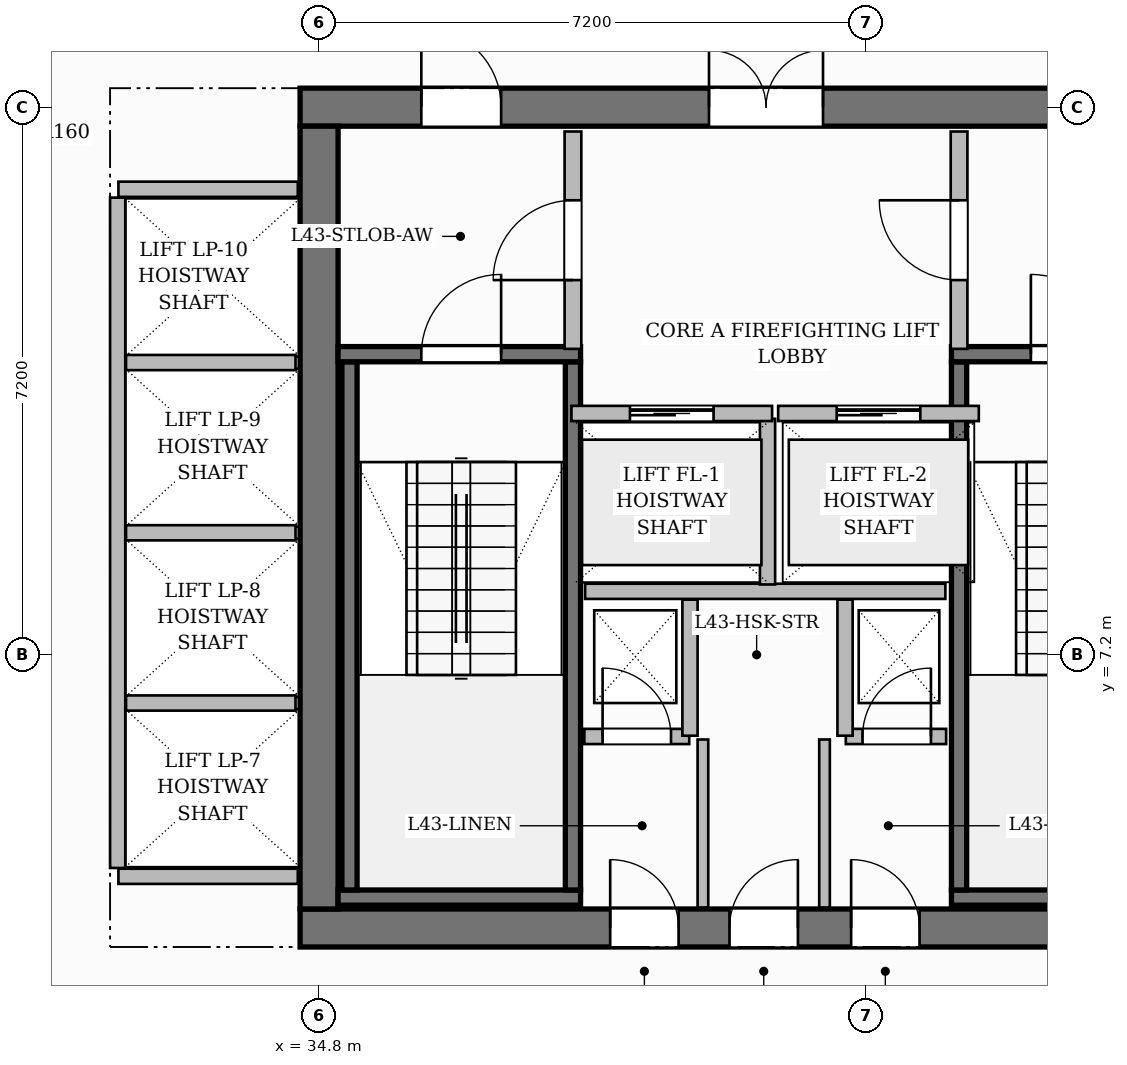
"""IFC4 building model, lengths in metres.
Left out: names, types, materials, properties, quantities, classifications, styles, units other than length and angle.
Written with IfcOpenShell. Run it as: python <this file> out.ifc"""

import sys

from ifc_helpers import new_model, si_unit, direction, frame, frame_2d, origin, place, context, subcontext, project, spatial, rectangle, extrude, source, transform, mapped, element, fill, save


model = new_model("IFC4")
c1 = context("Model", 3, precision=1e-05, world=origin(), true_north=direction((0.0, 1.0)))
c2 = subcontext(c1, "Body", "Model", "MODEL_VIEW")
j1 = project(units=[si_unit("LENGTHUNIT", "METRE"), si_unit("PLANEANGLEUNIT", "RADIAN")], contexts=[c1])
p1 = place(None, origin())
s1 = spatial("IfcSite", under=j1, at=p1, CompositionType="ELEMENT")
p2 = place(p1, origin())
s2 = spatial("IfcBuilding", under=s1, at=p2, CompositionType="ELEMENT")
p3 = place(p2, frame((0.0, 0.0, 173.4)))
s3 = spatial("IfcBuildingStorey", under=s2, at=p3, CompositionType="ELEMENT", Elevation=173.4)
p4 = place(p3, frame((34.55, 3.6, 0.0), z_axis=(0.0, 0.0, 1.0), x_axis=(1.0, 0.0, 0.0)))
e1 = element("IfcWall", 1, at=p4, inside=s3, PredefinedType="SHEAR", context=c2, shape_type="SweptSolid", body=[
    extrude(rectangle(XDim=15.5, YDim=0.5, at=frame_2d((7.75, 0.0))), origin(), (0.0, 0.0, 1.0), 3.85),
])
p5 = place(p4, frame((4.08, 0.0, 0.0)))
e2 = element("IfcOpeningElement", 2, at=p5, cuts=e1, PredefinedType="OPENING", context=c2, shape_type="SweptSolid", body=[
    extrude(rectangle(XDim=0.9, YDim=2.1, at=frame_2d((0.45, 1.05))), frame((0.0, 0.26, 0.0), z_axis=(0.0, -1.0, 0.0), x_axis=(1.0, 0.0, 0.0)), (0.0, 0.0, 1.0), 0.52),
])
p6 = place(p4, frame((5.65, 0.0, 0.0)))
e3 = element("IfcOpeningElement", 3, at=p6, cuts=e1, PredefinedType="OPENING", context=c2, shape_type="SweptSolid", body=[
    extrude(rectangle(XDim=0.9, YDim=2.1, at=frame_2d((0.45, 1.05))), frame((0.0, 0.26, 0.0), z_axis=(0.0, -1.0, 0.0), x_axis=(1.0, 0.0, 0.0)), (0.0, 0.0, 1.0), 0.52),
])
p7 = place(p4, frame((7.25, 0.0, 0.0)))
e4 = element("IfcOpeningElement", 4, at=p7, cuts=e1, PredefinedType="OPENING", context=c2, shape_type="SweptSolid", body=[
    extrude(rectangle(XDim=0.9, YDim=2.1, at=frame_2d((0.45, 1.05))), frame((0.0, 0.26, 0.0), z_axis=(0.0, -1.0, 0.0), x_axis=(1.0, 0.0, 0.0)), (0.0, 0.0, 1.0), 0.52),
])
p8 = place(p3, frame((34.55, 14.4, 0.0), z_axis=(0.0, 0.0, 1.0), x_axis=(1.0, 0.0, 0.0)))
e5 = element("IfcWall", 5, at=p8, inside=s3, PredefinedType="SHEAR", context=c2, shape_type="SweptSolid", body=[
    extrude(rectangle(XDim=15.5, YDim=0.5, at=frame_2d((7.75, 0.0))), origin(), (0.0, 0.0, 1.0), 3.85),
])
p9 = place(p8, frame((5.38, 0.0, 0.0)))
e6 = element("IfcOpeningElement", 6, at=p9, cuts=e5, PredefinedType="OPENING", context=c2, shape_type="SweptSolid", body=[
    extrude(rectangle(XDim=1.5, YDim=2.2, at=frame_2d((0.75, 1.1))), frame((0.0, 0.26, 0.0), z_axis=(0.0, -1.0, 0.0), x_axis=(1.0, 0.0, 0.0)), (0.0, 0.0, 1.0), 0.52),
])
p10 = place(p8, frame((1.595, 0.0, 0.0)))
e7 = element("IfcOpeningElement", 7, at=p10, cuts=e5, PredefinedType="OPENING", context=c2, shape_type="SweptSolid", body=[
    extrude(rectangle(XDim=1.05, YDim=2.15, at=frame_2d((0.525, 1.075))), frame((0.0, 0.26, 0.0), z_axis=(0.0, -1.0, 0.0), x_axis=(1.0, 0.0, 0.0)), (0.0, 0.0, 1.0), 0.52),
])
p11 = place(p8, frame((11.225, 0.0, 0.0)))
e8 = element("IfcOpeningElement", 8, at=p11, cuts=e5, PredefinedType="OPENING", context=c2, shape_type="SweptSolid", body=[
    extrude(rectangle(XDim=1.05, YDim=2.15, at=frame_2d((0.525, 1.075))), frame((0.0, 0.26, 0.0), z_axis=(0.0, -1.0, 0.0), x_axis=(1.0, 0.0, 0.0)), (0.0, 0.0, 1.0), 0.52),
])
p12 = place(p3, frame((34.8, 3.85, 0.0), z_axis=(0.0, 0.0, 1.0), x_axis=(0.0, 1.0, 0.0)))
e9 = element("IfcWall", 9, at=p12, inside=s3, PredefinedType="SHEAR", context=c2, shape_type="SweptSolid", body=[
    extrude(rectangle(XDim=10.3, YDim=0.5, at=frame_2d((5.15, 0.0))), origin(), (0.0, 0.0, 1.0), 3.85),
])
p13 = place(p3, frame((35.05, 4.0, 0.0), z_axis=(0.0, 0.0, 1.0), x_axis=(1.0, 0.0, 0.0)))
e10 = element("IfcWall", 10, at=p13, inside=s3, PredefinedType="SHEAR", context=c2, shape_type="SweptSolid", body=[
    extrude(rectangle(XDim=3.19, YDim=0.2, at=frame_2d((1.595, 0.0))), origin(), (0.0, 0.0, 1.0), 3.85),
])
for number, where, z_axis, x_axis in (
    (11, (35.2, 4.1, 0.0), (0.0, 0.0, 1.0), (0.0, 1.0, 0.0)),
    (12, (38.14, 4.1, 0.0), (0.0, 0.0, 1.0), (0.0, 1.0, 0.0)),
):
    element("IfcWall", number, at=place(p3, frame(where, z_axis=z_axis, x_axis=x_axis)), inside=s3, PredefinedType="SHEAR", context=c2, shape_type="SweptSolid", body=[
        extrude(rectangle(XDim=6.95, YDim=0.2, at=frame_2d((3.475, 0.0))), origin(), (0.0, 0.0, 1.0), 3.85),
    ])
p14 = place(p3, frame((35.05, 11.15, 0.0), z_axis=(0.0, 0.0, 1.0), x_axis=(1.0, 0.0, 0.0)))
e13 = element("IfcWall", 13, at=p14, inside=s3, PredefinedType="SHEAR", context=c2, shape_type="SweptSolid", body=[
    extrude(rectangle(XDim=3.19, YDim=0.2, at=frame_2d((1.595, 0.0))), origin(), (0.0, 0.0, 1.0), 3.85),
])
p15 = place(p14, frame((1.095, 0.0, 0.0)))
e14 = element("IfcOpeningElement", 14, at=p15, cuts=e13, PredefinedType="OPENING", context=c2, shape_type="SweptSolid", body=[
    extrude(rectangle(XDim=1.05, YDim=2.2, at=frame_2d((0.525, 1.1))), frame((0.0, 0.11, 0.0), z_axis=(0.0, -1.0, 0.0), x_axis=(1.0, 0.0, 0.0)), (0.0, 0.0, 1.0), 0.22),
])
p16 = place(p3, frame((43.12, 4.0, 0.0), z_axis=(0.0, 0.0, 1.0), x_axis=(1.0, 0.0, 0.0)))
e15 = element("IfcWall", 15, at=p16, inside=s3, PredefinedType="SHEAR", context=c2, shape_type="SweptSolid", body=[
    extrude(rectangle(XDim=6.43, YDim=0.2, at=frame_2d((3.215, 0.0))), origin(), (0.0, 0.0, 1.0), 3.85),
])
p17 = place(p3, frame((43.22, 4.1, 0.0), z_axis=(0.0, 0.0, 1.0), x_axis=(0.0, 1.0, 0.0)))
e16 = element("IfcWall", 16, at=p17, inside=s3, PredefinedType="SHEAR", context=c2, shape_type="SweptSolid", body=[
    extrude(rectangle(XDim=6.95, YDim=0.2, at=frame_2d((3.475, 0.0))), origin(), (0.0, 0.0, 1.0), 3.85),
])
p18 = place(p3, frame((43.12, 11.15, 0.0), z_axis=(0.0, 0.0, 1.0), x_axis=(1.0, 0.0, 0.0)))
e17 = element("IfcWall", 17, at=p18, inside=s3, PredefinedType="SHEAR", context=c2, shape_type="SweptSolid", body=[
    extrude(rectangle(XDim=6.43, YDim=0.2, at=frame_2d((3.215, 0.0))), origin(), (0.0, 0.0, 1.0), 3.85),
])
p19 = place(p18, frame((1.045, 0.0, 0.0)))
e18 = element("IfcOpeningElement", 18, at=p19, cuts=e17, PredefinedType="OPENING", context=c2, shape_type="SweptSolid", body=[
    extrude(rectangle(XDim=1.05, YDim=2.2, at=frame_2d((0.525, 1.1))), frame((0.0, 0.11, 0.0), z_axis=(0.0, -1.0, 0.0), x_axis=(1.0, 0.0, 0.0)), (0.0, 0.0, 1.0), 0.22),
])
p20 = place(p18, frame((4.125, 0.0, 0.0)))
e19 = element("IfcOpeningElement", 19, at=p20, cuts=e17, PredefinedType="OPENING", context=c2, shape_type="SweptSolid", body=[
    extrude(rectangle(XDim=1.05, YDim=2.2, at=frame_2d((0.525, 1.1))), frame((0.0, 0.11, 0.0), z_axis=(0.0, -1.0, 0.0), x_axis=(1.0, 0.0, 0.0)), (0.0, 0.0, 1.0), 0.22),
])
p21 = place(p3, frame((38.3, 8.03, 0.0), z_axis=(0.0, 0.0, 1.0), x_axis=(1.0, 0.0, 0.0)))
e20 = element("IfcWall", 20, at=p21, inside=s3, PredefinedType="PARTITIONING", context=c2, shape_type="SweptSolid", body=[
    extrude(rectangle(XDim=4.74, YDim=0.2, at=frame_2d((2.37, 0.0))), origin(), (0.0, 0.0, 1.0), 3.6),
])
p22 = place(p3, frame((40.7, 8.12, 0.0), z_axis=(0.0, 0.0, 1.0), x_axis=(0.0, 1.0, 0.0)))
e21 = element("IfcWall", 21, at=p22, inside=s3, PredefinedType="PARTITIONING", context=c2, shape_type="SweptSolid", body=[
    extrude(rectangle(XDim=2.18, YDim=0.2, at=frame_2d((1.09, 0.0))), origin(), (0.0, 0.0, 1.0), 3.6),
])
p23 = place(p3, frame((38.14, 11.22, 0.0), z_axis=(0.0, 0.0, 1.0), x_axis=(0.0, 1.0, 0.0)))
e22 = element("IfcWall", 22, at=p23, inside=s3, PredefinedType="PARTITIONING", context=c2, shape_type="SweptSolid", body=[
    extrude(rectangle(XDim=2.86, YDim=0.22, at=frame_2d((1.43, 0.0))), origin(), (0.0, 0.0, 1.0), 3.6),
])
p24 = place(p23, frame((0.905, 0.0, 0.0)))
e23 = element("IfcOpeningElement", 23, at=p24, cuts=e22, PredefinedType="OPENING", context=c2, shape_type="SweptSolid", body=[
    extrude(rectangle(XDim=1.05, YDim=2.15, at=frame_2d((0.525, 1.075))), frame((0.0, 0.12, 0.0), z_axis=(0.0, -1.0, 0.0), x_axis=(1.0, 0.0, 0.0)), (0.0, 0.0, 1.0), 0.24),
])
p25 = place(p3, frame((43.22, 11.22, 0.0), z_axis=(0.0, 0.0, 1.0), x_axis=(0.0, 1.0, 0.0)))
e24 = element("IfcWall", 24, at=p25, inside=s3, PredefinedType="PARTITIONING", context=c2, shape_type="SweptSolid", body=[
    extrude(rectangle(XDim=2.86, YDim=0.22, at=frame_2d((1.43, 0.0))), origin(), (0.0, 0.0, 1.0), 3.6),
])
p26 = place(p25, frame((0.905, 0.0, 0.0)))
e25 = element("IfcOpeningElement", 25, at=p26, cuts=e24, PredefinedType="OPENING", context=c2, shape_type="SweptSolid", body=[
    extrude(rectangle(XDim=1.05, YDim=2.15, at=frame_2d((0.525, 1.075))), frame((0.0, 0.12, 0.0), z_axis=(0.0, -1.0, 0.0), x_axis=(1.0, 0.0, 0.0)), (0.0, 0.0, 1.0), 0.24),
])
p27 = place(p3, frame((38.29, 6.12, 0.0), z_axis=(0.0, 0.0, 1.0), x_axis=(1.0, 0.0, 0.0)))
e26 = element("IfcWall", 26, at=p27, inside=s3, PredefinedType="PARTITIONING", context=c2, shape_type="SweptSolid", body=[
    extrude(rectangle(XDim=1.38, YDim=0.2, at=frame_2d((0.69, 0.0))), origin(), (0.0, 0.0, 1.0), 3.6),
])
p28 = place(p27, frame((0.24, 0.0, 0.0)))
e27 = element("IfcOpeningElement", 27, at=p28, cuts=e26, PredefinedType="OPENING", context=c2, shape_type="SweptSolid", body=[
    extrude(rectangle(XDim=0.9, YDim=2.1, at=frame_2d((0.45, 1.05))), frame((0.0, 0.11, 0.0), z_axis=(0.0, -1.0, 0.0), x_axis=(1.0, 0.0, 0.0)), (0.0, 0.0, 1.0), 0.22),
])
p29 = place(p3, frame((39.68, 6.13, 0.0), z_axis=(0.0, 0.0, 1.0), x_axis=(0.0, 1.0, 0.0)))
e28 = element("IfcWall", 28, at=p29, inside=s3, PredefinedType="PARTITIONING", context=c2, shape_type="SweptSolid", body=[
    extrude(rectangle(XDim=1.79, YDim=0.2, at=frame_2d((0.895, 0.0))), origin(), (0.0, 0.0, 1.0), 3.6),
])
p30 = place(p3, frame((41.73, 6.12, 0.0), z_axis=(0.0, 0.0, 1.0), x_axis=(1.0, 0.0, 0.0)))
e29 = element("IfcWall", 29, at=p30, inside=s3, PredefinedType="PARTITIONING", context=c2, shape_type="SweptSolid", body=[
    extrude(rectangle(XDim=1.32, YDim=0.2, at=frame_2d((0.66, 0.0))), origin(), (0.0, 0.0, 1.0), 3.6),
])
p31 = place(p30, frame((0.22, 0.0, 0.0)))
e30 = element("IfcOpeningElement", 30, at=p31, cuts=e29, PredefinedType="OPENING", context=c2, shape_type="SweptSolid", body=[
    extrude(rectangle(XDim=0.9, YDim=2.1, at=frame_2d((0.45, 1.05))), frame((0.0, 0.11, 0.0), z_axis=(0.0, -1.0, 0.0), x_axis=(1.0, 0.0, 0.0)), (0.0, 0.0, 1.0), 0.22),
])
p32 = place(p3, frame((41.72, 6.13, 0.0), z_axis=(0.0, 0.0, 1.0), x_axis=(0.0, 1.0, 0.0)))
e31 = element("IfcWall", 31, at=p32, inside=s3, PredefinedType="PARTITIONING", context=c2, shape_type="SweptSolid", body=[
    extrude(rectangle(XDim=1.79, YDim=0.2, at=frame_2d((0.895, 0.0))), origin(), (0.0, 0.0, 1.0), 3.6),
])
for number, where, z_axis, x_axis in (
    (32, (39.85, 3.87, 0.0), (0.0, 0.0, 1.0), (0.0, 1.0, 0.0)),
    (33, (41.45, 3.87, 0.0), (0.0, 0.0, 1.0), (0.0, 1.0, 0.0)),
):
    element("IfcWall", number, at=place(p3, frame(where, z_axis=z_axis, x_axis=x_axis)), inside=s3, PredefinedType="PARTITIONING", context=c2, shape_type="SweptSolid", body=[
        extrude(rectangle(XDim=2.21, YDim=0.14, at=frame_2d((1.105, 0.0))), origin(), (0.0, 0.0, 1.0), 3.6),
    ])
for number, where, z_axis, x_axis in (
    (34, (32.16, 4.28, 0.0), (0.0, 0.0, 1.0), (1.0, 0.0, 0.0)),
    (35, (32.16, 13.32, 0.0), (0.0, 0.0, 1.0), (1.0, 0.0, 0.0)),
):
    element("IfcWall", number, at=place(p3, frame(where, z_axis=z_axis, x_axis=x_axis)), inside=s3, PredefinedType="PARTITIONING", context=c2, shape_type="SweptSolid", body=[
        extrude(rectangle(XDim=2.36, YDim=0.2, at=frame_2d((1.18, 0.0))), origin(), (0.0, 0.0, 1.0), 3.6),
    ])
p33 = place(p3, frame((32.15, 4.39, 0.0), z_axis=(0.0, 0.0, 1.0), x_axis=(0.0, 1.0, 0.0)))
e36 = element("IfcWall", 36, at=p33, inside=s3, PredefinedType="PARTITIONING", context=c2, shape_type="SweptSolid", body=[
    extrude(rectangle(XDim=8.82, YDim=0.2, at=frame_2d((4.41, 0.0))), origin(), (0.0, 0.0, 1.0), 3.6),
])
for number, where, z_axis, x_axis in (
    (37, (32.26, 6.56, 0.0), (0.0, 0.0, 1.0), (1.0, 0.0, 0.0)),
    (38, (32.26, 8.8, 0.0), (0.0, 0.0, 1.0), (1.0, 0.0, 0.0)),
    (39, (32.26, 11.04, 0.0), (0.0, 0.0, 1.0), (1.0, 0.0, 0.0)),
):
    element("IfcWall", number, at=place(p3, frame(where, z_axis=z_axis, x_axis=x_axis)), inside=s3, PredefinedType="PARTITIONING", context=c2, shape_type="SweptSolid", body=[
        extrude(rectangle(XDim=2.23, YDim=0.2, at=frame_2d((1.115, 0.0))), origin(), (0.0, 0.0, 1.0), 3.6),
    ])
p34 = place(p3, frame((38.12, 10.37, 0.0), z_axis=(0.0, 0.0, 1.0), x_axis=(1.0, 0.0, 0.0)))
e40 = element("IfcWall", 40, at=p34, inside=s3, PredefinedType="PARTITIONING", context=c2, shape_type="SweptSolid", body=[
    extrude(rectangle(XDim=2.64, YDim=0.2, at=frame_2d((1.32, 0.0))), origin(), (0.0, 0.0, 1.0), 3.6),
])
p35 = place(p34, frame((0.77, 0.0, 0.0)))
e41 = element("IfcOpeningElement", 41, at=p35, cuts=e40, PredefinedType="OPENING", context=c2, shape_type="SweptSolid", body=[
    extrude(rectangle(XDim=1.1, YDim=2.2, at=frame_2d((0.55, 1.1))), frame((0.0, 0.11, 0.0), z_axis=(0.0, -1.0, 0.0), x_axis=(1.0, 0.0, 0.0)), (0.0, 0.0, 1.0), 0.22),
])
p36 = place(p3, frame((40.84, 10.37, 0.0), z_axis=(0.0, 0.0, 1.0), x_axis=(1.0, 0.0, 0.0)))
e42 = element("IfcWall", 42, at=p36, inside=s3, PredefinedType="PARTITIONING", context=c2, shape_type="SweptSolid", body=[
    extrude(rectangle(XDim=2.64, YDim=0.2, at=frame_2d((1.32, 0.0))), origin(), (0.0, 0.0, 1.0), 3.6),
])
p37 = place(p36, frame((0.77, 0.0, 0.0)))
e43 = element("IfcOpeningElement", 43, at=p37, cuts=e42, PredefinedType="OPENING", context=c2, shape_type="SweptSolid", body=[
    extrude(rectangle(XDim=1.1, YDim=2.2, at=frame_2d((0.55, 1.1))), frame((0.0, 0.11, 0.0), z_axis=(0.0, -1.0, 0.0), x_axis=(1.0, 0.0, 0.0)), (0.0, 0.0, 1.0), 0.22),
])
m1 = source(origin(), c2, "Body", "SweptSolid", [
    extrude(rectangle(XDim=1.05, YDim=2.2, at=frame_2d((0.525, 1.1))), frame((0.0, 0.025, 0.0), z_axis=(0.0, -1.0, 0.0), x_axis=(1.0, 0.0, 0.0)), (0.0, 0.0, 1.0), 0.05),
])
p38 = place(p15, origin())
e44 = element("IfcDoor", 44, at=p38, inside=s3, OperationType="SINGLE_SWING_RIGHT", PredefinedType="DOOR", context=c2, shape_type="MappedRepresentation", body=[
    mapped(m1, transform((0.0, 0.0, 0.0), scale=1.0)),
])
fill(e14, e44)
p39 = place(p19, origin())
e45 = element("IfcDoor", 45, at=p39, inside=s3, OperationType="SINGLE_SWING_LEFT", PredefinedType="DOOR", context=c2, shape_type="MappedRepresentation", body=[
    mapped(m1, transform((0.0, 0.0, 0.0), scale=1.0)),
])
fill(e18, e45)
m2 = source(origin(), c2, "Body", "SweptSolid", [
    extrude(rectangle(XDim=1.05, YDim=2.15, at=frame_2d((0.525, 1.075))), frame((0.0, 0.025, 0.0), z_axis=(0.0, -1.0, 0.0), x_axis=(1.0, 0.0, 0.0)), (0.0, 0.0, 1.0), 0.05),
])
p40 = place(p24, origin())
e46 = element("IfcDoor", 46, at=p40, inside=s3, OperationType="SINGLE_SWING_LEFT", PredefinedType="DOOR", context=c2, shape_type="MappedRepresentation", body=[
    mapped(m2, transform((0.0, 0.0, 0.0), scale=1.0)),
])
fill(e23, e46)
p41 = place(p26, origin())
e47 = element("IfcDoor", 47, at=p41, inside=s3, OperationType="SINGLE_SWING_RIGHT", PredefinedType="DOOR", context=c2, shape_type="MappedRepresentation", body=[
    mapped(m2, transform((0.0, 0.0, 0.0), scale=1.0)),
])
fill(e25, e47)
m3 = source(origin(), c2, "Body", "SweptSolid", [
    extrude(rectangle(XDim=1.5, YDim=2.2, at=frame_2d((0.75, 1.1))), frame((0.0, 0.025, 0.0), z_axis=(0.0, -1.0, 0.0), x_axis=(1.0, 0.0, 0.0)), (0.0, 0.0, 1.0), 0.05),
])
p42 = place(p9, origin())
e48 = element("IfcDoor", 48, at=p42, inside=s3, OperationType="DOUBLE_DOOR_SINGLE_SWING", PredefinedType="DOOR", context=c2, shape_type="MappedRepresentation", body=[
    mapped(m3, transform((0.0, 0.0, 0.0), scale=1.0)),
])
fill(e6, e48)
p43 = place(p10, origin())
e49 = element("IfcDoor", 49, at=p43, inside=s3, OperationType="SINGLE_SWING_LEFT", PredefinedType="DOOR", context=c2, shape_type="MappedRepresentation", body=[
    mapped(m2, transform((0.0, 0.0, 0.0), scale=1.0)),
])
fill(e7, e49)
m4 = source(origin(), c2, "Body", "SweptSolid", [
    extrude(rectangle(XDim=0.9, YDim=2.1, at=frame_2d((0.45, 1.05))), frame((0.0, 0.025, 0.0), z_axis=(0.0, -1.0, 0.0), x_axis=(1.0, 0.0, 0.0)), (0.0, 0.0, 1.0), 0.05),
])
p44 = place(p28, origin())
e50 = element("IfcDoor", 50, at=p44, inside=s3, OperationType="SINGLE_SWING_LEFT", PredefinedType="DOOR", context=c2, shape_type="MappedRepresentation", body=[
    mapped(m4, transform((0.0, 0.0, 0.0), scale=1.0)),
])
fill(e27, e50)
p45 = place(p31, origin())
e51 = element("IfcDoor", 51, at=p45, inside=s3, OperationType="SINGLE_SWING_RIGHT", PredefinedType="DOOR", context=c2, shape_type="MappedRepresentation", body=[
    mapped(m4, transform((0.0, 0.0, 0.0), scale=1.0)),
])
fill(e30, e51)
p46 = place(p5, origin())
e52 = element("IfcDoor", 52, at=p46, inside=s3, OperationType="SINGLE_SWING_LEFT", PredefinedType="DOOR", context=c2, shape_type="MappedRepresentation", body=[
    mapped(m4, transform((0.0, 0.0, 0.0), scale=1.0)),
])
fill(e2, e52)
p47 = place(p6, origin())
e53 = element("IfcDoor", 53, at=p47, inside=s3, OperationType="SINGLE_SWING_RIGHT", PredefinedType="DOOR", context=c2, shape_type="MappedRepresentation", body=[
    mapped(m4, transform((0.0, 0.0, 0.0), scale=1.0)),
])
fill(e3, e53)
p48 = place(p7, origin())
e54 = element("IfcDoor", 54, at=p48, inside=s3, OperationType="SINGLE_SWING_LEFT", PredefinedType="DOOR", context=c2, shape_type="MappedRepresentation", body=[
    mapped(m4, transform((0.0, 0.0, 0.0), scale=1.0)),
])
fill(e4, e54)
m5 = source(origin(), c2, "Body", "SweptSolid", [
    extrude(rectangle(XDim=1.1, YDim=2.2, at=frame_2d((0.55, 1.1))), frame((0.0, 0.025, 0.0), z_axis=(0.0, -1.0, 0.0), x_axis=(1.0, 0.0, 0.0)), (0.0, 0.0, 1.0), 0.05),
])
p49 = place(p35, origin())
e55 = element("IfcDoor", 55, at=p49, inside=s3, OperationType="SLIDING_TO_LEFT", PredefinedType="DOOR", context=c2, shape_type="MappedRepresentation", body=[
    mapped(m5, transform((0.0, 0.0, 0.0), scale=1.0)),
])
fill(e41, e55)
p50 = place(p37, origin())
e56 = element("IfcDoor", 56, at=p50, inside=s3, OperationType="SLIDING_TO_LEFT", PredefinedType="DOOR", context=c2, shape_type="MappedRepresentation", body=[
    mapped(m5, transform((0.0, 0.0, 0.0), scale=1.0)),
])
fill(e43, e56)
save(model, sys.argv[1])
